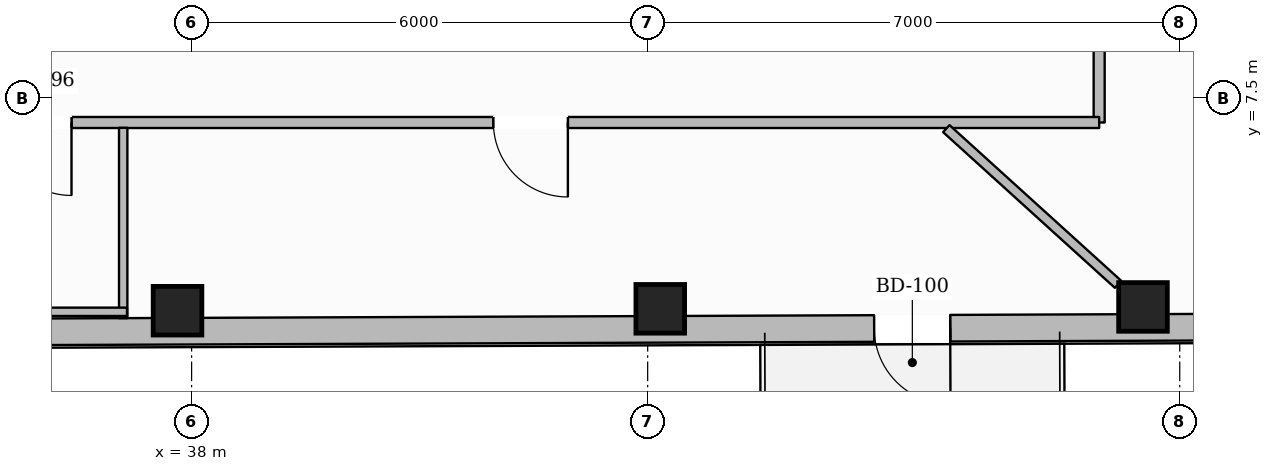
"""IFC4 building model, lengths in metres.
Left out: names, types, materials, properties, quantities, classifications, styles, units other than length and angle.
Written with IfcOpenShell. Run it as: python <this file> out.ifc"""

import sys

from ifc_helpers import new_model, si_unit, direction, frame, frame_2d, origin, origin_2d, place, context, subcontext, project, spatial, rectangle, hollow_rectangle, extrude, element, fill, save


model = new_model("IFC4")
c1 = context("Model", 3, precision=1e-05, world=origin(), true_north=direction((0.0, 1.0)))
c2 = subcontext(c1, "Body", "Model", "MODEL_VIEW")
j1 = project(units=[si_unit("LENGTHUNIT", "METRE"), si_unit("PLANEANGLEUNIT", "RADIAN")], contexts=[c1])
p1 = place(None, origin())
s1 = spatial("IfcSite", under=j1, at=p1, CompositionType="ELEMENT")
p2 = place(p1, origin())
s2 = spatial("IfcBuilding", under=s1, at=p2, CompositionType="ELEMENT")
p3 = place(p2, frame((0.0, 0.0, 230.45)))
s3 = spatial("IfcBuildingStorey", under=s2, at=p3, CompositionType="ELEMENT", Elevation=230.45)
for number, where, z_axis, x_axis in (
    (1, (37.815, 4.704, 0.0), (0.0, 0.0, 1.0), (1.0, 0.0, 0.0)),
    (2, (44.166, 4.729, 0.0), (0.0, 0.0, 1.0), (1.0, 0.0, 0.0)),
    (3, (50.517, 4.754, 0.0), (0.0, 0.0, 1.0), (1.0, 0.0, 0.0)),
):
    element("IfcColumn", number, at=place(p3, frame(where, z_axis=z_axis, x_axis=x_axis)), inside=s3, PredefinedType="COLUMN", context=c2, shape_type="SweptSolid", body=[
        extrude(hollow_rectangle(XDim=0.64, YDim=0.64, WallThickness=0.028, at=origin_2d()), origin(), (0.0, 0.0, 1.0), 3.43),
    ])
p4 = place(p3, frame((57.346, 4.51, 0.0), z_axis=(0.0, 0.0, 1.0), x_axis=(-0.999992347121, -0.003912249994, 0.0)))
e4 = element("IfcWall", 4, at=p4, inside=s3, PredefinedType="STANDARD", context=c2, shape_type="SweptSolid", body=[
    extrude(rectangle(XDim=39.065, YDim=0.35, at=frame_2d((19.532, 0.0))), origin(), (0.0, 0.0, 1.0), 2.962),
])
p5 = place(p4, frame((9.366, 0.0, 0.0)))
e5 = element("IfcOpeningElement", 5, at=p5, cuts=e4, PredefinedType="OPENING", context=c2, shape_type="SweptSolid", body=[
    extrude(rectangle(XDim=1.0, YDim=2.2, at=frame_2d((0.5, 1.1))), frame((0.0, 0.185, 0.0), z_axis=(0.0, -1.0, 0.0), x_axis=(1.0, 0.0, 0.0)), (0.0, 0.0, 1.0), 0.37),
])
p6 = place(p4, frame((34.683, 0.0, 0.55)))
e6 = element("IfcOpeningElement", 6, at=p6, cuts=e4, PredefinedType="OPENING", context=c2, shape_type="SweptSolid", body=[
    extrude(rectangle(XDim=1.45, YDim=1.6, at=frame_2d((0.725, 0.8))), frame((0.0, 0.185, 0.0), z_axis=(0.0, -1.0, 0.0), x_axis=(1.0, 0.0, 0.0)), (0.0, 0.0, 1.0), 0.37),
])
p7 = place(p4, frame((28.332, 0.0, 0.55)))
e7 = element("IfcOpeningElement", 7, at=p7, cuts=e4, PredefinedType="OPENING", context=c2, shape_type="SweptSolid", body=[
    extrude(rectangle(XDim=1.45, YDim=1.6, at=frame_2d((0.725, 0.8))), frame((0.0, 0.185, 0.0), z_axis=(0.0, -1.0, 0.0), x_axis=(1.0, 0.0, 0.0)), (0.0, 0.0, 1.0), 0.37),
])
p8 = place(p4, frame((21.981, 0.0, 0.55)))
e8 = element("IfcOpeningElement", 8, at=p8, cuts=e4, PredefinedType="OPENING", context=c2, shape_type="SweptSolid", body=[
    extrude(rectangle(XDim=1.45, YDim=1.6, at=frame_2d((0.725, 0.8))), frame((0.0, 0.185, 0.0), z_axis=(0.0, -1.0, 0.0), x_axis=(1.0, 0.0, 0.0)), (0.0, 0.0, 1.0), 0.37),
])
p9 = place(p4, frame((2.928, 0.0, 0.55)))
e9 = element("IfcOpeningElement", 9, at=p9, cuts=e4, PredefinedType="OPENING", context=c2, shape_type="SweptSolid", body=[
    extrude(rectangle(XDim=1.45, YDim=1.6, at=frame_2d((0.725, 0.8))), frame((0.0, 0.185, 0.0), z_axis=(0.0, -1.0, 0.0), x_axis=(1.0, 0.0, 0.0)), (0.0, 0.0, 1.0), 0.37),
])
p10 = place(p3, frame((49.94, 15.1, 0.0), z_axis=(0.0, 0.0, 1.0), x_axis=(0.0, -1.0, 0.0)))
e10 = element("IfcWall", 10, at=p10, inside=s3, PredefinedType="PARTITIONING", context=c2, shape_type="SweptSolid", body=[
    extrude(rectangle(XDim=7.92, YDim=0.145, at=frame_2d((3.96, 0.0))), origin(), (0.0, 0.0, 1.0), 3.43),
])
p11 = place(p3, frame((49.94, 7.18, 0.0), z_axis=(0.0, 0.0, 1.0), x_axis=(-1.0, 0.0, 0.0)))
e11 = element("IfcWall", 11, at=p11, inside=s3, PredefinedType="PARTITIONING", context=c2, shape_type="SweptSolid", body=[
    extrude(rectangle(XDim=23.88, YDim=0.145, at=frame_2d((11.94, 0.0))), origin(), (0.0, 0.0, 1.0), 3.169),
])
p12 = place(p11, frame((18.5, 0.0, 0.0)))
e12 = element("IfcOpeningElement", 12, at=p12, cuts=e11, PredefinedType="OPENING", context=c2, shape_type="SweptSolid", body=[
    extrude(rectangle(XDim=0.88, YDim=2.1, at=frame_2d((0.44, 1.05))), frame((0.0, 0.083, 0.0), z_axis=(0.0, -1.0, 0.0), x_axis=(1.0, 0.0, 0.0)), (0.0, 0.0, 1.0), 0.165),
])
p13 = place(p11, frame((15.98, 0.0, 0.0)))
e13 = element("IfcOpeningElement", 13, at=p13, cuts=e11, PredefinedType="OPENING", context=c2, shape_type="SweptSolid", body=[
    extrude(rectangle(XDim=0.88, YDim=2.1, at=frame_2d((0.44, 1.05))), frame((0.0, 0.083, 0.0), z_axis=(0.0, -1.0, 0.0), x_axis=(1.0, 0.0, 0.0)), (0.0, 0.0, 1.0), 0.165),
])
p14 = place(p11, frame((13.52, 0.0, 0.0)))
e14 = element("IfcOpeningElement", 14, at=p14, cuts=e11, PredefinedType="OPENING", context=c2, shape_type="SweptSolid", body=[
    extrude(rectangle(XDim=0.96, YDim=2.1, at=frame_2d((0.48, 1.05))), frame((0.0, 0.083, 0.0), z_axis=(0.0, -1.0, 0.0), x_axis=(1.0, 0.0, 0.0)), (0.0, 0.0, 1.0), 0.165),
])
p15 = place(p11, frame((21.459, 0.0, 0.0)))
e15 = element("IfcOpeningElement", 15, at=p15, cuts=e11, PredefinedType="OPENING", context=c2, shape_type="SweptSolid", body=[
    extrude(rectangle(XDim=0.98, YDim=2.15, at=frame_2d((0.49, 1.075))), frame((0.0, 0.083, 0.0), z_axis=(0.0, -1.0, 0.0), x_axis=(1.0, 0.0, 0.0)), (0.0, 0.0, 1.0), 0.165),
])
p16 = place(p11, frame((6.99, 0.0, 0.0)))
e16 = element("IfcOpeningElement", 16, at=p16, cuts=e11, PredefinedType="OPENING", context=c2, shape_type="SweptSolid", body=[
    extrude(rectangle(XDim=0.98, YDim=2.15, at=frame_2d((0.49, 1.075))), frame((0.0, 0.083, 0.0), z_axis=(0.0, -1.0, 0.0), x_axis=(1.0, 0.0, 0.0)), (0.0, 0.0, 1.0), 0.165),
])
p17 = place(p3, frame((37.1, 4.606, 0.0), z_axis=(0.0, 0.0, 1.0), x_axis=(0.0, 1.0, 0.0)))
e17 = element("IfcWall", 17, at=p17, inside=s3, PredefinedType="PLUMBINGWALL", context=c2, shape_type="SweptSolid", body=[
    extrude(rectangle(XDim=2.504, YDim=0.11, at=frame_2d((1.252, 0.0))), origin(), (0.0, 0.0, 1.0), 3.43),
])
p18 = place(p3, frame((29.69, 4.689, 0.0), z_axis=(0.0, 0.0, 1.0), x_axis=(1.0, 0.0, 0.0)))
e18 = element("IfcWall", 18, at=p18, inside=s3, PredefinedType="PLUMBINGWALL", context=c2, shape_type="SweptSolid", body=[
    extrude(rectangle(XDim=7.46, YDim=0.11, at=frame_2d((3.73, 0.0))), origin(), (0.0, 0.0, 1.0), 2.965),
])
p19 = place(p3, frame((47.929, 7.1, 0.0), z_axis=(0.0, 0.0, 1.0), x_axis=(0.740877413659, -0.671640274202, 0.0)))
e19 = element("IfcWall", 19, at=p19, inside=s3, PredefinedType="PARTITIONING", context=c2, shape_type="SweptSolid", body=[
    extrude(rectangle(XDim=3.05, YDim=0.125, at=frame_2d((1.525, 0.0))), origin(), (0.0, 0.0, 1.0), 3.43),
])
p20 = place(p5, origin())
e20 = element("IfcDoor", 20, at=p20, inside=s3, OperationType="SINGLE_SWING_LEFT", PredefinedType="DOOR", context=c2, shape_type="SweptSolid", body=[
    extrude(rectangle(XDim=1.0, YDim=2.2, at=frame_2d((0.5, 1.1))), frame((0.0, 0.025, 0.0), z_axis=(0.0, -1.0, 0.0), x_axis=(1.0, 0.0, 0.0)), (0.0, 0.0, 1.0), 0.05),
])
fill(e5, e20)
p21 = place(p14, origin())
e21 = element("IfcDoor", 21, at=p21, inside=s3, OperationType="SINGLE_SWING_LEFT", PredefinedType="DOOR", context=c2, shape_type="SweptSolid", body=[
    extrude(rectangle(XDim=0.96, YDim=2.1, at=frame_2d((0.48, 1.05))), frame((0.0, 0.025, 0.0), z_axis=(0.0, -1.0, 0.0), x_axis=(1.0, 0.0, 0.0)), (0.0, 0.0, 1.0), 0.05),
])
fill(e14, e21)
p22 = place(p16, origin())
e22 = element("IfcDoor", 22, at=p22, inside=s3, OperationType="SINGLE_SWING_LEFT", PredefinedType="DOOR", context=c2, shape_type="SweptSolid", body=[
    extrude(rectangle(XDim=0.98, YDim=2.15, at=frame_2d((0.49, 1.075))), frame((0.0, 0.025, 0.0), z_axis=(0.0, -1.0, 0.0), x_axis=(1.0, 0.0, 0.0)), (0.0, 0.0, 1.0), 0.05),
])
fill(e16, e22)
save(model, sys.argv[1])
